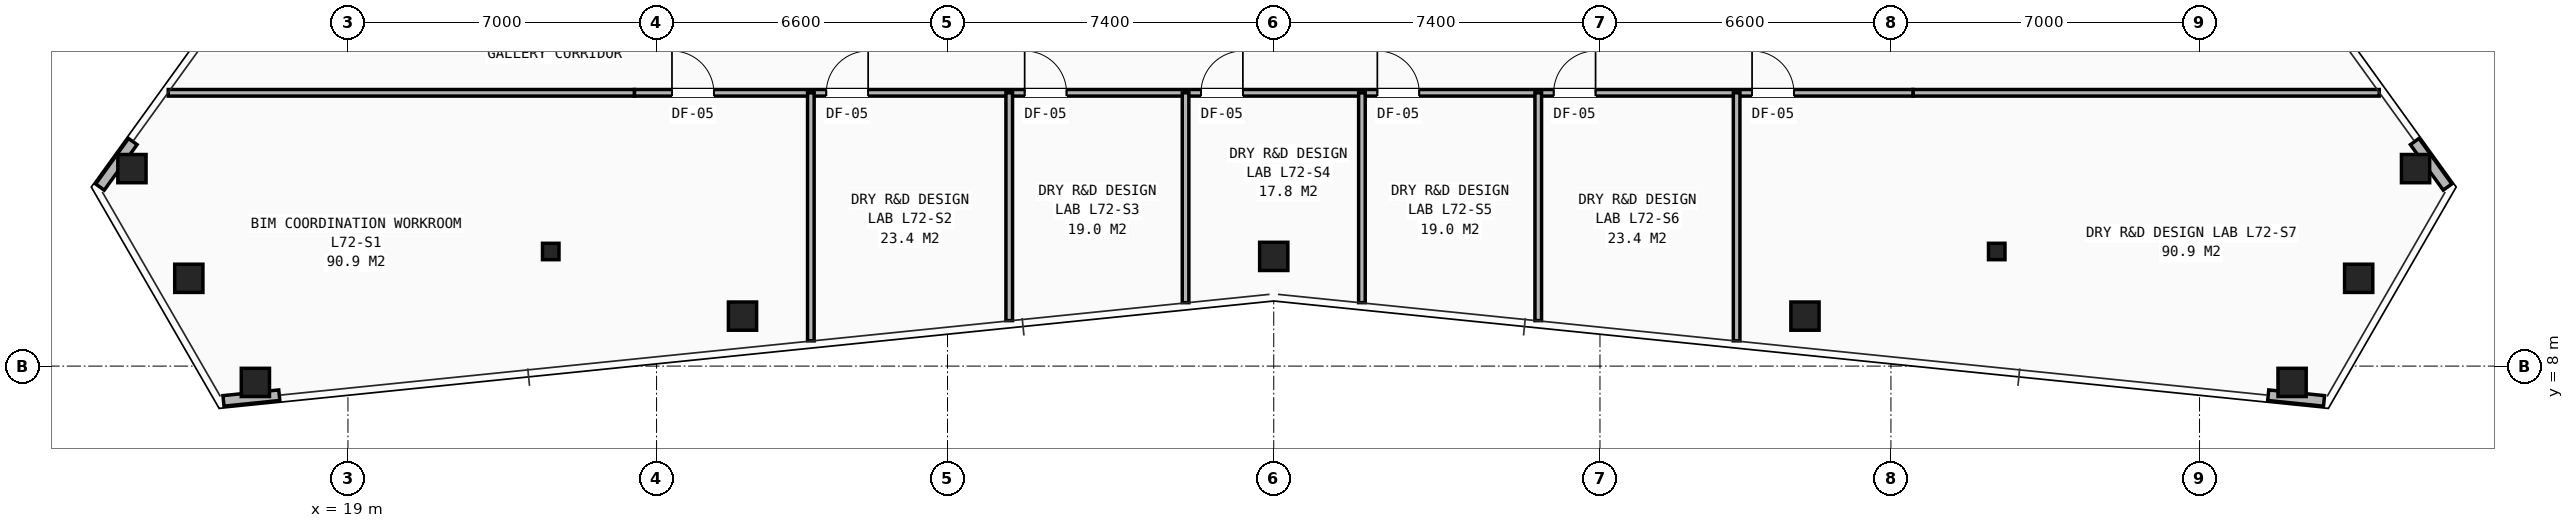
"""IFC4 building model, lengths in metres.
Left out: names, types, materials, properties, quantities, classifications, styles, units other than length and angle.
Written with IfcOpenShell. Run it as: python <this file> out.ifc"""

import sys

from ifc_helpers import new_model, si_unit, direction, frame, frame_2d, origin, origin_2d, place, context, subcontext, project, spatial, rectangle, hollow_rectangle, i_section, extrude, element, fill, save


model = new_model("IFC4")
c1 = context("Model", 3, precision=1e-05, world=origin(), true_north=direction((0.0, 1.0)))
c2 = subcontext(c1, "Body", "Model", "MODEL_VIEW")
j1 = project(units=[si_unit("LENGTHUNIT", "METRE"), si_unit("PLANEANGLEUNIT", "RADIAN")], contexts=[c1])
p1 = place(None, origin())
s1 = spatial("IfcSite", under=j1, at=p1, CompositionType="ELEMENT")
p2 = place(p1, origin())
s2 = spatial("IfcBuilding", under=s1, at=p2, CompositionType="ELEMENT")
p3 = place(p2, frame((0.0, 0.0, 255.0)))
s3 = spatial("IfcBuildingStorey", under=s2, at=p3, CompositionType="ELEMENT", Elevation=255.0)
for number, where, z_axis, x_axis in (
    (1, (23.6, 10.6, 0.0), (0.0, 0.0, 1.0), (1.0, 0.0, 0.0)),
    (2, (56.4, 10.6, 0.0), (0.0, 0.0, 1.0), (1.0, 0.0, 0.0)),
):
    element("IfcColumn", number, at=place(p3, frame(where, z_axis=z_axis, x_axis=x_axis)), inside=s3, PredefinedType="COLUMN", context=c2, shape_type="SweptSolid", body=[
        extrude(i_section(OverallWidth=0.374, OverallDepth=0.372, WebThickness=0.016, FlangeThickness=0.026, at=origin_2d()), origin(), (0.0, 0.0, 1.0), 3.5),
    ])
for number, where, z_axis, x_axis in (
    (3, (14.1, 12.48, 0.0), (0.0, 0.0, 1.0), (1.0, 0.0, 0.0)),
    (4, (15.39, 9.991, 0.0), (0.0, 0.0, 1.0), (1.0, 0.0, 0.0)),
    (5, (16.9, 7.63, 0.0), (0.0, 0.0, 1.0), (1.0, 0.0, 0.0)),
    (6, (27.95, 9.134, 0.0), (0.0, 0.0, 1.0), (1.0, 0.0, 0.0)),
    (7, (40.0, 10.489, 0.0), (0.0, 0.0, 1.0), (1.0, 0.0, 0.0)),
    (8, (52.05, 9.134, 0.0), (0.0, 0.0, 1.0), (1.0, 0.0, 0.0)),
    (9, (63.1, 7.63, 0.0), (0.0, 0.0, 1.0), (1.0, 0.0, 0.0)),
    (10, (64.61, 9.991, 0.0), (0.0, 0.0, 1.0), (1.0, 0.0, 0.0)),
    (11, (65.9, 12.48, 0.0), (0.0, 0.0, 1.0), (1.0, 0.0, 0.0)),
):
    element("IfcColumn", number, at=place(p3, frame(where, z_axis=z_axis, x_axis=x_axis)), inside=s3, PredefinedType="COLUMN", context=c2, shape_type="SweptSolid", body=[
        extrude(hollow_rectangle(XDim=0.64, YDim=0.64, WallThickness=0.045, at=origin_2d()), origin(), (0.0, 0.0, 1.0), 3.5),
    ])
p4 = place(p3, frame((14.12, 13.094, 0.0), z_axis=(0.0, 0.0, 1.0), x_axis=(-0.585112505524, -0.810952129216, 0.0)))
e12 = element("IfcWall", 12, at=p4, inside=s3, PredefinedType="SHEAR", context=c2, shape_type="SweptSolid", body=[
    extrude(rectangle(XDim=1.273, YDim=0.24, at=frame_2d((0.637, 0.0))), origin(), (0.0, 0.0, 1.0), 2.623),
])
for number, where, z_axis, x_axis in (
    (13, (16.176, 7.211, 0.0), (0.0, 0.0, 1.0), (0.995, 0.101, 0.0)),
    (14, (62.558, 7.34, 0.0), (0.0, 0.0, 1.0), (0.995, -0.101, 0.0)),
):
    element("IfcWall", number, at=place(p3, frame(where, z_axis=z_axis, x_axis=x_axis)), inside=s3, PredefinedType="SHEAR", context=c2, shape_type="SweptSolid", body=[
        extrude(rectangle(XDim=1.272, YDim=0.24, at=frame_2d((0.636, 0.0))), origin(), (0.0, 0.0, 1.0), 2.623),
    ])
p5 = place(p3, frame((66.625, 12.062, 0.0), z_axis=(0.0, 0.0, 1.0), x_axis=(-0.585112505524, 0.810952129216, 0.0)))
e15 = element("IfcWall", 15, at=p5, inside=s3, PredefinedType="SHEAR", context=c2, shape_type="SweptSolid", body=[
    extrude(rectangle(XDim=1.273, YDim=0.24, at=frame_2d((0.637, 0.0))), origin(), (0.0, 0.0, 1.0), 2.623),
])
for number, where, z_axis, x_axis in (
    (16, (14.924, 14.2, 0.0), (0.0, 0.0, 1.0), (1.0, 0.0, 0.0)),
    (17, (54.5, 14.2, 0.0), (0.0, 0.0, 1.0), (1.0, 0.0, 0.0)),
):
    element("IfcWall", number, at=place(p3, frame(where, z_axis=z_axis, x_axis=x_axis)), inside=s3, PredefinedType="PARTITIONING", context=c2, shape_type="SweptSolid", body=[
        extrude(rectangle(XDim=10.576, YDim=0.15, at=frame_2d((5.288, 0.0))), origin(), (0.0, 0.0, 1.0), 2.292),
    ])
p6 = place(p3, frame((25.5, 14.2, 0.0), z_axis=(0.0, 0.0, 1.0), x_axis=(1.0, 0.0, 0.0)))
e18 = element("IfcWall", 18, at=p6, inside=s3, PredefinedType="PARTITIONING", context=c2, shape_type="SweptSolid", body=[
    extrude(rectangle(XDim=29.0, YDim=0.15, at=frame_2d((14.5, 0.0))), origin(), (0.0, 0.0, 1.0), 2.292),
])
p7 = place(p6, frame((0.85, 0.0, 0.0)))
e19 = element("IfcOpeningElement", 19, at=p7, cuts=e18, PredefinedType="OPENING", context=c2, shape_type="SweptSolid", body=[
    extrude(rectangle(XDim=0.95, YDim=2.1, at=frame_2d((0.475, 1.05))), frame((0.0, 0.085, 0.0), z_axis=(0.0, -1.0, 0.0), x_axis=(1.0, 0.0, 0.0)), (0.0, 0.0, 1.0), 0.17),
])
p8 = place(p6, frame((4.35, 0.0, 0.0)))
e20 = element("IfcOpeningElement", 20, at=p8, cuts=e18, PredefinedType="OPENING", context=c2, shape_type="SweptSolid", body=[
    extrude(rectangle(XDim=0.95, YDim=2.1, at=frame_2d((0.475, 1.05))), frame((0.0, 0.085, 0.0), z_axis=(0.0, -1.0, 0.0), x_axis=(1.0, 0.0, 0.0)), (0.0, 0.0, 1.0), 0.17),
])
p9 = place(p6, frame((8.85, 0.0, 0.0)))
e21 = element("IfcOpeningElement", 21, at=p9, cuts=e18, PredefinedType="OPENING", context=c2, shape_type="SweptSolid", body=[
    extrude(rectangle(XDim=0.95, YDim=2.1, at=frame_2d((0.475, 1.05))), frame((0.0, 0.085, 0.0), z_axis=(0.0, -1.0, 0.0), x_axis=(1.0, 0.0, 0.0)), (0.0, 0.0, 1.0), 0.17),
])
p10 = place(p6, frame((12.85, 0.0, 0.0)))
e22 = element("IfcOpeningElement", 22, at=p10, cuts=e18, PredefinedType="OPENING", context=c2, shape_type="SweptSolid", body=[
    extrude(rectangle(XDim=0.95, YDim=2.1, at=frame_2d((0.475, 1.05))), frame((0.0, 0.085, 0.0), z_axis=(0.0, -1.0, 0.0), x_axis=(1.0, 0.0, 0.0)), (0.0, 0.0, 1.0), 0.17),
])
p11 = place(p6, frame((16.85, 0.0, 0.0)))
e23 = element("IfcOpeningElement", 23, at=p11, cuts=e18, PredefinedType="OPENING", context=c2, shape_type="SweptSolid", body=[
    extrude(rectangle(XDim=0.95, YDim=2.1, at=frame_2d((0.475, 1.05))), frame((0.0, 0.085, 0.0), z_axis=(0.0, -1.0, 0.0), x_axis=(1.0, 0.0, 0.0)), (0.0, 0.0, 1.0), 0.17),
])
p12 = place(p6, frame((20.85, 0.0, 0.0)))
e24 = element("IfcOpeningElement", 24, at=p12, cuts=e18, PredefinedType="OPENING", context=c2, shape_type="SweptSolid", body=[
    extrude(rectangle(XDim=0.95, YDim=2.1, at=frame_2d((0.475, 1.05))), frame((0.0, 0.085, 0.0), z_axis=(0.0, -1.0, 0.0), x_axis=(1.0, 0.0, 0.0)), (0.0, 0.0, 1.0), 0.17),
])
p13 = place(p6, frame((25.35, 0.0, 0.0)))
e25 = element("IfcOpeningElement", 25, at=p13, cuts=e18, PredefinedType="OPENING", context=c2, shape_type="SweptSolid", body=[
    extrude(rectangle(XDim=0.95, YDim=2.1, at=frame_2d((0.475, 1.05))), frame((0.0, 0.085, 0.0), z_axis=(0.0, -1.0, 0.0), x_axis=(1.0, 0.0, 0.0)), (0.0, 0.0, 1.0), 0.17),
])
p14 = place(p3, frame((29.5, 8.573, 0.0), z_axis=(0.0, 0.0, 1.0), x_axis=(0.0, 1.0, 0.0)))
e26 = element("IfcWall", 26, at=p14, inside=s3, PredefinedType="PARTITIONING", context=c2, shape_type="SweptSolid", body=[
    extrude(rectangle(XDim=5.627, YDim=0.15, at=frame_2d((2.813, 0.0))), origin(), (0.0, 0.0, 1.0), 2.628),
])
p15 = place(p3, frame((34.0, 9.031, 0.0), z_axis=(0.0, 0.0, 1.0), x_axis=(0.0, 1.0, 0.0)))
e27 = element("IfcWall", 27, at=p15, inside=s3, PredefinedType="PARTITIONING", context=c2, shape_type="SweptSolid", body=[
    extrude(rectangle(XDim=5.168, YDim=0.15, at=frame_2d((2.584, 0.0))), origin(), (0.0, 0.0, 1.0), 2.628),
])
p16 = place(p3, frame((38.0, 9.439, 0.0), z_axis=(0.0, 0.0, 1.0), x_axis=(0.0, 1.0, 0.0)))
e28 = element("IfcWall", 28, at=p16, inside=s3, PredefinedType="PARTITIONING", context=c2, shape_type="SweptSolid", body=[
    extrude(rectangle(XDim=4.761, YDim=0.15, at=frame_2d((2.381, 0.0))), origin(), (0.0, 0.0, 1.0), 2.292),
])
p17 = place(p3, frame((42.0, 9.439, 0.0), z_axis=(0.0, 0.0, 1.0), x_axis=(0.0, 1.0, 0.0)))
e29 = element("IfcWall", 29, at=p17, inside=s3, PredefinedType="PARTITIONING", context=c2, shape_type="SweptSolid", body=[
    extrude(rectangle(XDim=4.761, YDim=0.15, at=frame_2d((2.381, 0.0))), origin(), (0.0, 0.0, 1.0), 2.628),
])
p18 = place(p3, frame((46.0, 9.031, 0.0), z_axis=(0.0, 0.0, 1.0), x_axis=(0.0, 1.0, 0.0)))
e30 = element("IfcWall", 30, at=p18, inside=s3, PredefinedType="PARTITIONING", context=c2, shape_type="SweptSolid", body=[
    extrude(rectangle(XDim=5.168, YDim=0.15, at=frame_2d((2.584, 0.0))), origin(), (0.0, 0.0, 1.0), 2.628),
])
p19 = place(p3, frame((50.5, 8.573, 0.0), z_axis=(0.0, 0.0, 1.0), x_axis=(0.0, 1.0, 0.0)))
e31 = element("IfcWall", 31, at=p19, inside=s3, PredefinedType="PARTITIONING", context=c2, shape_type="SweptSolid", body=[
    extrude(rectangle(XDim=5.627, YDim=0.15, at=frame_2d((2.813, 0.0))), origin(), (0.0, 0.0, 1.0), 2.628),
])
p20 = place(p7, origin())
e32 = element("IfcDoor", 32, at=p20, inside=s3, OperationType="SINGLE_SWING_LEFT", PredefinedType="DOOR", context=c2, shape_type="SweptSolid", body=[
    extrude(rectangle(XDim=0.95, YDim=2.1, at=frame_2d((0.475, 1.05))), frame((0.0, 0.025, 0.0), z_axis=(0.0, -1.0, 0.0), x_axis=(1.0, 0.0, 0.0)), (0.0, 0.0, 1.0), 0.05),
])
fill(e19, e32)
p21 = place(p8, origin())
e33 = element("IfcDoor", 33, at=p21, inside=s3, OperationType="SINGLE_SWING_RIGHT", PredefinedType="DOOR", context=c2, shape_type="SweptSolid", body=[
    extrude(rectangle(XDim=0.95, YDim=2.1, at=frame_2d((0.475, 1.05))), frame((0.0, 0.025, 0.0), z_axis=(0.0, -1.0, 0.0), x_axis=(1.0, 0.0, 0.0)), (0.0, 0.0, 1.0), 0.05),
])
fill(e20, e33)
p22 = place(p9, origin())
e34 = element("IfcDoor", 34, at=p22, inside=s3, OperationType="SINGLE_SWING_LEFT", PredefinedType="DOOR", context=c2, shape_type="SweptSolid", body=[
    extrude(rectangle(XDim=0.95, YDim=2.1, at=frame_2d((0.475, 1.05))), frame((0.0, 0.025, 0.0), z_axis=(0.0, -1.0, 0.0), x_axis=(1.0, 0.0, 0.0)), (0.0, 0.0, 1.0), 0.05),
])
fill(e21, e34)
p23 = place(p10, origin())
e35 = element("IfcDoor", 35, at=p23, inside=s3, OperationType="SINGLE_SWING_RIGHT", PredefinedType="DOOR", context=c2, shape_type="SweptSolid", body=[
    extrude(rectangle(XDim=0.95, YDim=2.1, at=frame_2d((0.475, 1.05))), frame((0.0, 0.025, 0.0), z_axis=(0.0, -1.0, 0.0), x_axis=(1.0, 0.0, 0.0)), (0.0, 0.0, 1.0), 0.05),
])
fill(e22, e35)
p24 = place(p11, origin())
e36 = element("IfcDoor", 36, at=p24, inside=s3, OperationType="SINGLE_SWING_LEFT", PredefinedType="DOOR", context=c2, shape_type="SweptSolid", body=[
    extrude(rectangle(XDim=0.95, YDim=2.1, at=frame_2d((0.475, 1.05))), frame((0.0, 0.025, 0.0), z_axis=(0.0, -1.0, 0.0), x_axis=(1.0, 0.0, 0.0)), (0.0, 0.0, 1.0), 0.05),
])
fill(e23, e36)
p25 = place(p12, origin())
e37 = element("IfcDoor", 37, at=p25, inside=s3, OperationType="SINGLE_SWING_RIGHT", PredefinedType="DOOR", context=c2, shape_type="SweptSolid", body=[
    extrude(rectangle(XDim=0.95, YDim=2.1, at=frame_2d((0.475, 1.05))), frame((0.0, 0.025, 0.0), z_axis=(0.0, -1.0, 0.0), x_axis=(1.0, 0.0, 0.0)), (0.0, 0.0, 1.0), 0.05),
])
fill(e24, e37)
p26 = place(p13, origin())
e38 = element("IfcDoor", 38, at=p26, inside=s3, OperationType="SINGLE_SWING_LEFT", PredefinedType="DOOR", context=c2, shape_type="SweptSolid", body=[
    extrude(rectangle(XDim=0.95, YDim=2.1, at=frame_2d((0.475, 1.05))), frame((0.0, 0.025, 0.0), z_axis=(0.0, -1.0, 0.0), x_axis=(1.0, 0.0, 0.0)), (0.0, 0.0, 1.0), 0.05),
])
fill(e25, e38)
save(model, sys.argv[1])
